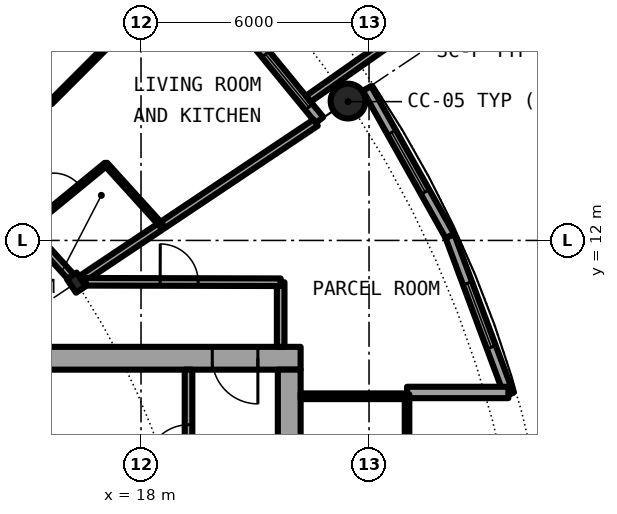
"""IFC4 building model, lengths in metres.
Left out: names, types, materials, properties, quantities, classifications, styles, units other than length and angle.
Written with IfcOpenShell. Run it as: python <this file> out.ifc"""

import sys

from ifc_helpers import new_model, si_unit, direction, frame, frame_2d, origin, origin_2d, place, context, subcontext, project, spatial, rectangle, hollow_circle, i_section, extrude, element, fill, save


model = new_model("IFC4")
c1 = context("Model", 3, precision=1e-05, world=origin(), true_north=direction((0.0, 1.0)))
c2 = subcontext(c1, "Body", "Model", "MODEL_VIEW")
j1 = project(units=[si_unit("LENGTHUNIT", "METRE"), si_unit("PLANEANGLEUNIT", "RADIAN")], contexts=[c1])
p1 = place(None, origin())
s1 = spatial("IfcSite", under=j1, at=p1, CompositionType="ELEMENT")
p2 = place(p1, origin())
s2 = spatial("IfcBuilding", under=s1, at=p2, CompositionType="ELEMENT")
p3 = place(p2, frame((0.0, 0.0, 117.75)))
s3 = spatial("IfcBuildingStorey", under=s2, at=p3, CompositionType="ELEMENT", Elevation=117.75)
p4 = place(p3, frame((23.448, 15.667, 0.0), z_axis=(0.0, 0.0, 1.0), x_axis=(1.0, 0.0, 0.0)))
e1 = element("IfcColumn", 1, at=p4, inside=s3, PredefinedType="COLUMN", context=c2, shape_type="SweptSolid", body=[
    extrude(hollow_circle(Radius=0.457, WallThickness=0.04, at=origin_2d()), origin(), (0.0, 0.0, 1.0), 3.05),
])
p5 = place(p3, frame((16.297, 10.889, 0.0), z_axis=(0.0, 0.0, 1.0), x_axis=(0.831469612303, 0.55557023302, 0.0)))
e2 = element("IfcColumn", 2, at=p5, inside=s3, PredefinedType="COLUMN", context=c2, shape_type="SweptSolid", body=[
    extrude(i_section(OverallWidth=0.307, OverallDepth=0.432, WebThickness=0.021, FlangeThickness=0.04, FilletRadius=0.027, at=origin_2d()), origin(), (0.0, 0.0, 1.0), 3.05),
])
p6 = place(p3, frame((22.699, 15.167, 0.0), z_axis=(0.0, 0.0, 1.0), x_axis=(-0.634382322723, 0.773019449054, 0.0)))
e3 = element("IfcWall", 3, at=p6, inside=s3, PredefinedType="SOLIDWALL", context=c2, shape_type="SweptSolid", body=[
    extrude(rectangle(XDim=5.352, YDim=0.25, at=frame_2d((2.676, 0.0))), origin(), (0.0, 0.0, 1.0), 2.7),
])
p7 = place(p6, frame((0.441, 0.0, 0.3)))
e4 = element("IfcOpeningElement", 4, at=p7, cuts=e3, PredefinedType="OPENING", context=c2, shape_type="SweptSolid", body=[
    extrude(rectangle(XDim=1.8, YDim=2.1, at=frame_2d((0.9, 1.05))), frame((0.0, 0.135, 0.0), z_axis=(0.0, -1.0, 0.0), x_axis=(1.0, 0.0, 0.0)), (0.0, 0.0, 1.0), 0.27),
])
p8 = place(p6, frame((3.51, 0.0, 0.0)))
e5 = element("IfcOpeningElement", 5, at=p8, cuts=e3, PredefinedType="OPENING", context=c2, shape_type="SweptSolid", body=[
    extrude(rectangle(XDim=1.0, YDim=2.2, at=frame_2d((0.5, 1.1))), frame((0.0, 0.135, 0.0), z_axis=(0.0, -1.0, 0.0), x_axis=(1.0, 0.0, 0.0)), (0.0, 0.0, 1.0), 0.27),
])
p9 = place(p3, frame((22.402, 15.726, -0.03), z_axis=(0.0, 0.0, 1.0), x_axis=(0.818275399393, 0.574826383135, 0.0)))
e6 = element("IfcWall", 6, at=p9, inside=s3, PredefinedType="SOLIDWALL", context=c2, shape_type="SweptSolid", body=[
    extrude(rectangle(XDim=2.929, YDim=0.2, at=frame_2d((1.465, 0.0))), origin(), (0.0, 0.0, 1.0), 2.73),
])
p10 = place(p3, frame((27.682, 7.945, 0.0), z_axis=(0.0, 0.0, 1.0), x_axis=(-0.349247811493, 0.937030397675, 0.0)))
e7 = element("IfcWall", 7, at=p10, inside=s3, PredefinedType="SOLIDWALL", context=c2, shape_type="SweptSolid", body=[
    extrude(rectangle(XDim=4.452, YDim=0.25, at=frame_2d((2.226, 0.0))), origin(), (0.0, 0.0, 1.0), 2.7),
])
p11 = place(p10, frame((1.327, 0.0, 0.3)))
e8 = element("IfcOpeningElement", 8, at=p11, cuts=e7, PredefinedType="OPENING", context=c2, shape_type="SweptSolid", body=[
    extrude(rectangle(XDim=1.8, YDim=2.1, at=frame_2d((0.9, 1.05))), frame((0.0, 0.135, 0.0), z_axis=(0.0, -1.0, 0.0), x_axis=(1.0, 0.0, 0.0)), (0.0, 0.0, 1.0), 0.27),
])
p12 = place(p3, frame((26.127, 12.117, 0.0), z_axis=(0.0, 0.0, 1.0), x_axis=(-0.489696356642, 0.871893042919, 0.0)))
e9 = element("IfcWall", 9, at=p12, inside=s3, PredefinedType="SOLIDWALL", context=c2, shape_type="SweptSolid", body=[
    extrude(rectangle(XDim=4.454, YDim=0.25, at=frame_2d((2.227, 0.0))), origin(), (0.0, 0.0, 1.0), 2.7),
])
p13 = place(p12, frame((1.327, 0.0, 0.3)))
e10 = element("IfcOpeningElement", 10, at=p13, cuts=e9, PredefinedType="OPENING", context=c2, shape_type="SweptSolid", body=[
    extrude(rectangle(XDim=1.8, YDim=2.1, at=frame_2d((0.9, 1.05))), frame((0.0, 0.135, 0.0), z_axis=(0.0, -1.0, 0.0), x_axis=(1.0, 0.0, 0.0)), (0.0, 0.0, 1.0), 0.27),
])
p14 = place(p3, frame((25.0, 8.0, 0.0), z_axis=(0.0, 0.0, 1.0), x_axis=(1.0, 0.0, 0.0)))
e11 = element("IfcWall", 11, at=p14, inside=s3, PredefinedType="SOLIDWALL", context=c2, shape_type="SweptSolid", body=[
    extrude(rectangle(XDim=2.667, YDim=0.3, at=frame_2d((1.333, 0.0))), origin(), (0.0, 0.0, 1.0), 2.7),
])
p15 = place(p3, frame((22.2, 8.9, 0.0), z_axis=(0.0, 0.0, 1.0), x_axis=(-1.0, 0.0, 0.0)))
e12 = element("IfcWall", 12, at=p15, inside=s3, PredefinedType="SHEAR", context=c2, shape_type="SweptSolid", body=[
    extrude(rectangle(XDim=13.8, YDim=0.6, at=frame_2d((6.9, 0.0))), origin(), (0.0, 0.0, 1.0), 3.05),
])
p16 = place(p15, frame((1.125, 0.0, 0.0)))
e13 = element("IfcOpeningElement", 13, at=p16, cuts=e12, PredefinedType="OPENING", context=c2, shape_type="SweptSolid", body=[
    extrude(rectangle(XDim=1.2, YDim=2.3, at=frame_2d((0.6, 1.15))), frame((0.0, 0.31, 0.0), z_axis=(0.0, -1.0, 0.0), x_axis=(1.0, 0.0, 0.0)), (0.0, 0.0, 1.0), 0.62),
])
p17 = place(p3, frame((21.9, 8.6, 0.0), z_axis=(0.0, 0.0, 1.0), x_axis=(0.0, -1.0, 0.0)))
e14 = element("IfcWall", 14, at=p17, inside=s3, PredefinedType="SHEAR", context=c2, shape_type="SweptSolid", body=[
    extrude(rectangle(XDim=17.2, YDim=0.6, at=frame_2d((8.6, 0.0))), origin(), (0.0, 0.0, 1.0), 3.05),
])
p18 = place(p17, frame((7.7, 0.0, 0.0)))
e15 = element("IfcOpeningElement", 15, at=p18, cuts=e14, PredefinedType="OPENING", context=c2, shape_type="SweptSolid", body=[
    extrude(rectangle(XDim=1.8, YDim=2.3, at=frame_2d((0.9, 1.15))), frame((0.0, 0.31, 0.0), z_axis=(0.0, -1.0, 0.0), x_axis=(1.0, 0.0, 0.0)), (0.0, 0.0, 1.0), 0.62),
])
p19 = place(p3, frame((19.25, 1.575, 0.0), z_axis=(0.0, 0.0, 1.0), x_axis=(0.0, 1.0, 0.0)))
e16 = element("IfcWall", 16, at=p19, inside=s3, PredefinedType="SOLIDWALL", context=c2, shape_type="SweptSolid", body=[
    extrude(rectangle(XDim=7.025, YDim=0.2, at=frame_2d((3.513, 0.0))), origin(), (0.0, 0.0, 1.0), 2.7),
])
p20 = place(p19, frame((4.475, 0.0, 0.0)))
e17 = element("IfcOpeningElement", 17, at=p20, cuts=e16, PredefinedType="OPENING", context=c2, shape_type="SweptSolid", body=[
    extrude(rectangle(XDim=1.1, YDim=2.3, at=frame_2d((0.55, 1.15))), frame((0.0, 0.11, 0.0), z_axis=(0.0, -1.0, 0.0), x_axis=(1.0, 0.0, 0.0)), (0.0, 0.0, 1.0), 0.22),
])
p21 = place(p3, frame((22.2, 7.9, 0.0), z_axis=(0.0, 0.0, 1.0), x_axis=(1.0, 0.0, 0.0)))
e18 = element("IfcWall", 18, at=p21, inside=s3, PredefinedType="PARTITIONING", context=c2, shape_type="SweptSolid", body=[
    extrude(rectangle(XDim=2.74, YDim=0.15, at=frame_2d((1.37, 0.0))), origin(), (0.0, 0.0, 1.0), 2.7),
])
p22 = place(p3, frame((25.0, -7.95, 0.0), z_axis=(0.0, 0.0, 1.0), x_axis=(0.0, 1.0, 0.0)))
e19 = element("IfcWall", 19, at=p22, inside=s3, PredefinedType="PARTITIONING", context=c2, shape_type="SweptSolid", body=[
    extrude(rectangle(XDim=15.9, YDim=0.12, at=frame_2d((7.95, 0.0))), origin(), (0.0, 0.0, 1.0), 2.7),
])
p23 = place(p22, frame((0.95, 0.0, 0.1)))
e20 = element("IfcOpeningElement", 20, at=p23, cuts=e19, PredefinedType="OPENING", context=c2, shape_type="SweptSolid", body=[
    extrude(rectangle(XDim=14.0, YDim=2.35, at=frame_2d((7.0, 1.175))), frame((0.0, 0.07, 0.0), z_axis=(0.0, -1.0, 0.0), x_axis=(1.0, 0.0, 0.0)), (0.0, 0.0, 1.0), 0.14),
])
p24 = place(p3, frame((21.675, 9.2, 0.0), z_axis=(0.0, 0.0, 1.0), x_axis=(0.0, 1.0, 0.0)))
e21 = element("IfcWall", 21, at=p24, inside=s3, PredefinedType="PARTITIONING", context=c2, shape_type="SweptSolid", body=[
    extrude(rectangle(XDim=1.7, YDim=0.2, at=frame_2d((0.85, 0.0))), origin(), (0.0, 0.0, 1.0), 2.7),
])
p25 = place(p3, frame((12.436, 15.149, 0.0), z_axis=(0.0, 0.0, 1.0), x_axis=(0.63447412651, 0.772944100689, 0.0)))
e22 = element("IfcWall", 22, at=p25, inside=s3, PredefinedType="PARTITIONING", context=c2, shape_type="SweptSolid", body=[
    extrude(rectangle(XDim=7.576, YDim=0.2, at=frame_2d((3.788, 0.0))), origin(), (0.0, 0.0, 1.0), 2.7),
])
p26 = place(p3, frame((15.01, 12.309, 0.0), z_axis=(0.0, 0.0, 1.0), x_axis=(0.773240932873, 0.634112339992, 0.0)))
e23 = element("IfcWall", 23, at=p26, inside=s3, PredefinedType="PARTITIONING", context=c2, shape_type="SweptSolid", body=[
    extrude(rectangle(XDim=2.674, YDim=0.1, at=frame_2d((1.337, 0.0))), origin(), (0.0, 0.0, 1.0), 2.7),
])
p27 = place(p26, frame((0.887, 0.0, 0.0)))
e24 = element("IfcOpeningElement", 24, at=p27, cuts=e23, PredefinedType="OPENING", context=c2, shape_type="SweptSolid", body=[
    extrude(rectangle(XDim=0.9, YDim=2.3, at=frame_2d((0.45, 1.15))), frame((0.0, 0.06, 0.0), z_axis=(0.0, -1.0, 0.0), x_axis=(1.0, 0.0, 0.0)), (0.0, 0.0, 1.0), 0.12),
])
p28 = place(p3, frame((15.613, 15.621, 0.0), z_axis=(0.0, 0.0, 1.0), x_axis=(0.706914880313, 0.707298629994, 0.0)))
e25 = element("IfcWall", 25, at=p28, inside=s3, PredefinedType="PARTITIONING", context=c2, shape_type="SweptSolid", body=[
    extrude(rectangle(XDim=5.09, YDim=0.1, at=frame_2d((2.545, 0.0))), origin(), (0.0, 0.0, 1.0), 2.7),
])
p29 = place(p28, frame((2.095, 0.0, 0.0)))
e26 = element("IfcOpeningElement", 26, at=p29, cuts=e25, PredefinedType="OPENING", context=c2, shape_type="SweptSolid", body=[
    extrude(rectangle(XDim=0.9, YDim=2.3, at=frame_2d((0.45, 1.15))), frame((0.0, 0.06, 0.0), z_axis=(0.0, -1.0, 0.0), x_axis=(1.0, 0.0, 0.0)), (0.0, 0.0, 1.0), 0.12),
])
p30 = place(p3, frame((16.477, 11.009, 0.0), z_axis=(0.0, 0.0, 1.0), x_axis=(0.831406593008, 0.555664536482, 0.0)))
e27 = element("IfcWall", 27, at=p30, inside=s3, PredefinedType="PARTITIONING", context=c2, shape_type="SweptSolid", body=[
    extrude(rectangle(XDim=7.358, YDim=0.2, at=frame_2d((3.679, 0.0))), origin(), (0.0, 0.0, 1.0), 2.7),
])
p31 = place(p3, frame((16.541, 10.912, 0.0), z_axis=(0.0, 0.0, 1.0), x_axis=(0.999997173357, -0.002377662213, 0.0)))
e28 = element("IfcWall", 28, at=p31, inside=s3, PredefinedType="PARTITIONING", context=c2, shape_type="SweptSolid", body=[
    extrude(rectangle(XDim=5.134, YDim=0.2, at=frame_2d((2.567, 0.0))), origin(), (0.0, 0.0, 1.0), 2.7),
])
p32 = place(p31, frame((1.963, 0.0, 0.0)))
e29 = element("IfcOpeningElement", 29, at=p32, cuts=e28, PredefinedType="OPENING", context=c2, shape_type="SweptSolid", body=[
    extrude(rectangle(XDim=1.0, YDim=2.3, at=frame_2d((0.5, 1.15))), frame((0.0, 0.11, 0.0), z_axis=(0.0, -1.0, 0.0), x_axis=(1.0, 0.0, 0.0)), (0.0, 0.0, 1.0), 0.22),
])
p33 = place(p3, frame((12.434, 15.151, 0.0), z_axis=(0.0, 0.0, 1.0), x_axis=(0.671481997275, -0.741020868354, 0.0)))
e30 = element("IfcWall", 30, at=p33, inside=s3, PredefinedType="PARTITIONING", context=c2, shape_type="SweptSolid", body=[
    extrude(rectangle(XDim=5.596, YDim=0.2, at=frame_2d((2.798, 0.0))), origin(), (0.0, 0.0, 1.0), 2.39),
])
p34 = place(p33, frame((1.417, 0.0, 0.0)))
e31 = element("IfcOpeningElement", 31, at=p34, cuts=e30, PredefinedType="OPENING", context=c2, shape_type="SweptSolid", body=[
    extrude(rectangle(XDim=1.0, YDim=2.3, at=frame_2d((0.5, 1.15))), frame((0.0, 0.11, 0.0), z_axis=(0.0, -1.0, 0.0), x_axis=(1.0, 0.0, 0.0)), (0.0, 0.0, 1.0), 0.22),
])
p35 = place(p3, frame((17.072, 14.011, 0.0), z_axis=(0.0, 0.0, 1.0), x_axis=(0.67169789574, -0.740825172937, 0.0)))
e32 = element("IfcWall", 32, at=p35, inside=s3, PredefinedType="PARTITIONING", context=c2, shape_type="SweptSolid", body=[
    extrude(rectangle(XDim=2.183, YDim=0.1, at=frame_2d((1.091, 0.0))), origin(), (0.0, 0.0, 1.0), 2.7),
])
p36 = place(p7, origin())
e33 = element("IfcWindow", 33, at=p36, inside=s3, PartitioningType="SINGLE_PANEL", PredefinedType="WINDOW", context=c2, shape_type="SweptSolid", body=[
    extrude(rectangle(XDim=1.8, YDim=2.1, at=frame_2d((0.9, 1.05))), frame((0.0, 0.03, 0.0), z_axis=(0.0, -1.0, 0.0), x_axis=(1.0, 0.0, 0.0)), (0.0, 0.0, 1.0), 0.06),
])
fill(e4, e33)
p37 = place(p11, origin())
e34 = element("IfcWindow", 34, at=p37, inside=s3, PartitioningType="SINGLE_PANEL", PredefinedType="WINDOW", context=c2, shape_type="SweptSolid", body=[
    extrude(rectangle(XDim=1.8, YDim=2.1, at=frame_2d((0.9, 1.05))), frame((0.0, 0.03, 0.0), z_axis=(0.0, -1.0, 0.0), x_axis=(1.0, 0.0, 0.0)), (0.0, 0.0, 1.0), 0.06),
])
fill(e8, e34)
p38 = place(p13, origin())
e35 = element("IfcWindow", 35, at=p38, inside=s3, PartitioningType="SINGLE_PANEL", PredefinedType="WINDOW", context=c2, shape_type="SweptSolid", body=[
    extrude(rectangle(XDim=1.8, YDim=2.1, at=frame_2d((0.9, 1.05))), frame((0.0, 0.03, 0.0), z_axis=(0.0, -1.0, 0.0), x_axis=(1.0, 0.0, 0.0)), (0.0, 0.0, 1.0), 0.06),
])
fill(e10, e35)
p39 = place(p20, origin())
e36 = element("IfcDoor", 36, at=p39, inside=s3, OperationType="SINGLE_SWING_LEFT", PredefinedType="DOOR", context=c2, shape_type="SweptSolid", body=[
    extrude(rectangle(XDim=1.1, YDim=2.3, at=frame_2d((0.55, 1.15))), frame((0.0, 0.025, 0.0), z_axis=(0.0, -1.0, 0.0), x_axis=(1.0, 0.0, 0.0)), (0.0, 0.0, 1.0), 0.05),
])
fill(e17, e36)
p40 = place(p16, origin())
e37 = element("IfcDoor", 37, at=p40, inside=s3, OperationType="SINGLE_SWING_RIGHT", PredefinedType="DOOR", context=c2, shape_type="SweptSolid", body=[
    extrude(rectangle(XDim=1.2, YDim=2.3, at=frame_2d((0.6, 1.15))), frame((0.0, 0.025, 0.0), z_axis=(0.0, -1.0, 0.0), x_axis=(1.0, 0.0, 0.0)), (0.0, 0.0, 1.0), 0.05),
])
fill(e13, e37)
p41 = place(p23, origin())
e38 = element("IfcWindow", 38, at=p41, inside=s3, PartitioningType="SINGLE_PANEL", PredefinedType="WINDOW", context=c2, shape_type="SweptSolid", body=[
    extrude(rectangle(XDim=14.0, YDim=2.35, at=frame_2d((7.0, 1.175))), frame((0.0, 0.03, 0.0), z_axis=(0.0, -1.0, 0.0), x_axis=(1.0, 0.0, 0.0)), (0.0, 0.0, 1.0), 0.06),
])
fill(e20, e38)
p42 = place(p27, origin())
e39 = element("IfcDoor", 39, at=p42, inside=s3, OperationType="SINGLE_SWING_LEFT", PredefinedType="DOOR", context=c2, shape_type="SweptSolid", body=[
    extrude(rectangle(XDim=0.9, YDim=2.3, at=frame_2d((0.45, 1.15))), frame((0.0, 0.025, 0.0), z_axis=(0.0, -1.0, 0.0), x_axis=(1.0, 0.0, 0.0)), (0.0, 0.0, 1.0), 0.05),
])
fill(e24, e39)
p43 = place(p32, origin())
e40 = element("IfcDoor", 40, at=p43, inside=s3, OperationType="SINGLE_SWING_LEFT", PredefinedType="DOOR", context=c2, shape_type="SweptSolid", body=[
    extrude(rectangle(XDim=1.0, YDim=2.3, at=frame_2d((0.5, 1.15))), frame((0.0, 0.025, 0.0), z_axis=(0.0, -1.0, 0.0), x_axis=(1.0, 0.0, 0.0)), (0.0, 0.0, 1.0), 0.05),
])
fill(e29, e40)
save(model, sys.argv[1])
